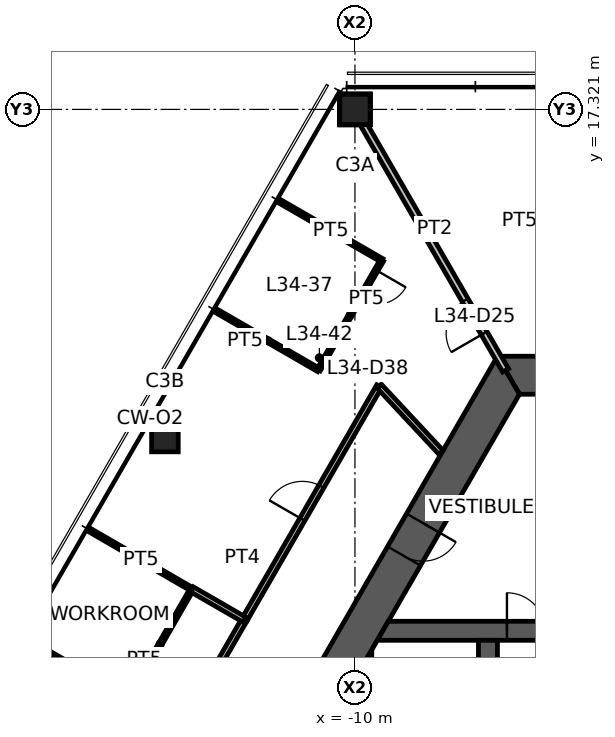
"""IFC4 building model, lengths in metres.
Left out: names, types, materials, properties, quantities, classifications, styles, units other than length and angle.
Written with IfcOpenShell. Run it as: python <this file> out.ifc"""

import sys

from ifc_helpers import new_model, si_unit, direction, frame, frame_2d, origin, origin_2d, place, context, subcontext, project, spatial, polyline, rectangle, hollow_rectangle, outline, extrude, element, fill, save


model = new_model("IFC4")
c1 = context("Model", 3, precision=1e-05, world=origin(), true_north=direction((0.0, 1.0)))
c2 = subcontext(c1, "Body", "Model", "MODEL_VIEW")
j1 = project(units=[si_unit("LENGTHUNIT", "METRE"), si_unit("PLANEANGLEUNIT", "RADIAN")], contexts=[c1])
p1 = place(None, origin())
s1 = spatial("IfcSite", under=j1, at=p1, CompositionType="ELEMENT")
p2 = place(p1, origin())
s2 = spatial("IfcBuilding", under=s1, at=p2, CompositionType="ELEMENT")
p3 = place(p2, frame((0.0, 0.0, 137.0)))
s3 = spatial("IfcBuildingStorey", under=s2, at=p3, CompositionType="ELEMENT", Elevation=137.0)
p4 = place(p3, frame((-10.0, 17.321, 0.0), z_axis=(0.0, 0.0, 1.0), x_axis=(1.0, 0.0, 0.0)))
e1 = element("IfcColumn", 1, at=p4, inside=s3, PredefinedType="COLUMN", context=c2, shape_type="SweptSolid", body=[
    extrude(hollow_rectangle(XDim=0.8, YDim=0.8, WallThickness=0.045, at=origin_2d()), origin(), (0.0, 0.0, 1.0), 3.9),
])
p5 = place(p3, frame((-15.0, 8.66, 0.0), z_axis=(0.0, 0.0, 1.0), x_axis=(1.0, 0.0, 0.0)))
e2 = element("IfcColumn", 2, at=p5, inside=s3, PredefinedType="COLUMN", context=c2, shape_type="SweptSolid", body=[
    extrude(hollow_rectangle(XDim=0.7, YDim=0.7, WallThickness=0.036, at=origin_2d()), origin(), (0.0, 0.0, 1.0), 3.9),
])
p6 = place(p3, frame((5.961, 10.325, 0.0), z_axis=(0.0, 0.0, 1.0), x_axis=(-1.0, 0.0, 0.0)))
e3 = element("IfcWall", 3, at=p6, inside=s3, PredefinedType="SHEAR", context=c2, shape_type="SweptSolid", body=[
    extrude(outline(polyline([(-0.289, -0.5), (4.661, -0.5), (5.561, -0.5), (6.361, -0.5), (7.261, -0.5), (12.211, -0.5), (11.634, 0.5), (7.261, 0.5), (6.361, 0.5), (5.561, 0.5), (4.661, 0.5), (0.289, 0.5), (-0.289, -0.5)])), origin(), (0.0, 0.0, 1.0), 3.9),
])
p7 = place(p6, frame((6.361, 0.0, 0.0)))
e4 = element("IfcOpeningElement", 4, at=p7, cuts=e3, PredefinedType="OPENING", context=c2, shape_type="SweptSolid", body=[
    extrude(rectangle(XDim=0.9, YDim=2.1, at=frame_2d((0.45, 1.05))), frame((0.0, 0.51, 0.0), z_axis=(0.0, -1.0, 0.0), x_axis=(1.0, 0.0, 0.0)), (0.0, 0.0, 1.0), 1.02),
])
p8 = place(p6, frame((4.661, 0.0, 0.0)))
e5 = element("IfcOpeningElement", 5, at=p8, cuts=e3, PredefinedType="OPENING", context=c2, shape_type="SweptSolid", body=[
    extrude(rectangle(XDim=0.9, YDim=2.1, at=frame_2d((0.45, 1.05))), frame((0.0, 0.51, 0.0), z_axis=(0.0, -1.0, 0.0), x_axis=(1.0, 0.0, 0.0)), (0.0, 0.0, 1.0), 1.02),
])
p9 = place(p3, frame((-5.961, 10.325, 0.0), z_axis=(0.0, 0.0, 1.0), x_axis=(-0.500004296715, -0.866022923061, 0.0)))
e6 = element("IfcWall", 6, at=p9, inside=s3, PredefinedType="SHEAR", context=c2, shape_type="SweptSolid", body=[
    extrude(outline(polyline([(-0.289, -0.5), (4.494, -0.5), (5.494, -0.5), (12.211, -0.5), (11.634, 0.5), (5.494, 0.5), (4.494, 0.5), (0.289, 0.5), (-0.289, -0.5)])), origin(), (0.0, 0.0, 1.0), 3.9),
])
p10 = place(p9, frame((4.494, 0.0, 0.0)))
e7 = element("IfcOpeningElement", 7, at=p10, cuts=e6, PredefinedType="OPENING", context=c2, shape_type="SweptSolid", body=[
    extrude(rectangle(XDim=1.0, YDim=2.1, at=frame_2d((0.5, 1.05))), frame((0.0, 0.51, 0.0), z_axis=(0.0, -1.0, 0.0), x_axis=(1.0, 0.0, 0.0)), (0.0, 0.0, 1.0), 1.02),
])
p11 = place(p3, frame((-9.266, 3.6, 0.0), z_axis=(0.0, 0.0, 1.0), x_axis=(1.0, 0.0, 0.0)))
e8 = element("IfcWall", 8, at=p11, inside=s3, PredefinedType="SHEAR", context=c2, shape_type="SweptSolid", body=[
    extrude(outline(polyline([(-0.144, -0.25), (3.266, -0.25), (4.266, -0.25), (5.667, -0.25), (6.767, -0.25), (7.916, -0.25), (7.916, 0.25), (6.767, 0.25), (5.667, 0.25), (4.266, 0.25), (3.266, 0.25), (0.144, 0.25), (-0.144, -0.25)])), origin(), (0.0, 0.0, 1.0), 3.9),
])
p12 = place(p11, frame((3.266, 0.0, 0.0)))
e9 = element("IfcOpeningElement", 9, at=p12, cuts=e8, PredefinedType="OPENING", context=c2, shape_type="SweptSolid", body=[
    extrude(rectangle(XDim=1.0, YDim=2.1, at=frame_2d((0.5, 1.05))), frame((0.0, 0.26, 0.0), z_axis=(0.0, -1.0, 0.0), x_axis=(1.0, 0.0, 0.0)), (0.0, 0.0, 1.0), 0.52),
])
p13 = place(p11, frame((5.667, 0.0, 0.0)))
e10 = element("IfcOpeningElement", 10, at=p13, cuts=e8, PredefinedType="OPENING", context=c2, shape_type="SweptSolid", body=[
    extrude(rectangle(XDim=1.1, YDim=2.1, at=frame_2d((0.55, 1.05))), frame((0.0, 0.26, 0.0), z_axis=(0.0, -1.0, 0.0), x_axis=(1.0, 0.0, 0.0)), (0.0, 0.0, 1.0), 0.52),
])
p14 = place(p3, frame((-6.5, -3.35, 0.0), z_axis=(0.0, 0.0, 1.0), x_axis=(0.0, 1.0, 0.0)))
e11 = element("IfcWall", 11, at=p14, inside=s3, PredefinedType="SHEAR", context=c2, shape_type="SweptSolid", body=[
    extrude(rectangle(XDim=6.7, YDim=0.5, at=frame_2d((3.35, 0.0))), origin(), (0.0, 0.0, 1.0), 3.9),
])
p15 = place(p14, frame((0.1, 0.0, 0.0)))
e12 = element("IfcOpeningElement", 12, at=p15, cuts=e11, PredefinedType="OPENING", context=c2, shape_type="SweptSolid", body=[
    extrude(rectangle(XDim=1.0, YDim=2.1, at=frame_2d((0.5, 1.05))), frame((0.0, 0.26, 0.0), z_axis=(0.0, -1.0, 0.0), x_axis=(1.0, 0.0, 0.0)), (0.0, 0.0, 1.0), 0.52),
])
p16 = place(p3, frame((-9.808, -2.662, 0.0), z_axis=(0.0, 0.0, 1.0), x_axis=(0.0, 1.0, 0.0)))
e13 = element("IfcWall", 13, at=p16, inside=s3, PredefinedType="SHEAR", context=c2, shape_type="SweptSolid", body=[
    extrude(outline(polyline([(-0.433, -0.25), (5.758, -0.25), (4.892, 0.25), (0.433, 0.25), (-0.433, -0.25)])), origin(), (0.0, 0.0, 1.0), 3.9),
])
p17 = place(p3, frame((-6.035, 10.453, 0.0), z_axis=(0.0, 0.0, 1.0), x_axis=(-0.499989830942, 0.866031274813, 0.0)))
e14 = element("IfcWall", 14, at=p17, inside=s3, PredefinedType="PARTITIONING", context=c2, shape_type="SweptSolid", body=[
    extrude(rectangle(XDim=7.93, YDim=0.175, at=frame_2d((3.965, 0.0))), origin(), (0.0, 0.0, 1.0), 3.05),
])
p18 = place(p17, frame((1.13, 0.0, 0.0)))
e15 = element("IfcOpeningElement", 15, at=p18, cuts=e14, PredefinedType="OPENING", context=c2, shape_type="SweptSolid", body=[
    extrude(rectangle(XDim=1.0, YDim=2.1, at=frame_2d((0.5, 1.05))), frame((0.0, 0.098, 0.0), z_axis=(0.0, -1.0, 0.0), x_axis=(1.0, 0.0, 0.0)), (0.0, 0.0, 1.0), 0.195),
])
p19 = place(p3, frame((-15.156, 0.0, 0.0), z_axis=(0.0, 0.0, 1.0), x_axis=(0.500014848696, 0.866016830716, 0.0)))
e16 = element("IfcWall", 16, at=p19, inside=s3, PredefinedType="PARTITIONING", context=c2, shape_type="SweptSolid", body=[
    extrude(rectangle(XDim=4.505, YDim=0.15, at=frame_2d((2.252, 0.0))), origin(), (0.0, 0.0, 1.0), 2.95),
])
p20 = place(p3, frame((-12.908, 3.893, 0.0), z_axis=(0.0, 0.0, 1.0), x_axis=(0.500006411147, 0.866021702275, 0.0)))
e17 = element("IfcWall", 17, at=p20, inside=s3, PredefinedType="PARTITIONING", context=c2, shape_type="SweptSolid", body=[
    extrude(rectangle(XDim=7.095, YDim=0.15, at=frame_2d((3.548, 0.0))), origin(), (0.0, 0.0, 1.0), 2.95),
])
p21 = place(p20, frame((3.047, 0.0, 0.0)))
e18 = element("IfcOpeningElement", 18, at=p21, cuts=e17, PredefinedType="OPENING", context=c2, shape_type="SweptSolid", body=[
    extrude(rectangle(XDim=1.0, YDim=2.1, at=frame_2d((0.5, 1.05))), frame((0.0, 0.085, 0.0), z_axis=(0.0, -1.0, 0.0), x_axis=(1.0, 0.0, 0.0)), (0.0, 0.0, 1.0), 0.17),
])
p22 = place(p3, frame((-9.36, 10.038, 0.0), z_axis=(0.0, 0.0, 1.0), x_axis=(0.681997114248, -0.731354863358, 0.0)))
e19 = element("IfcWall", 19, at=p22, inside=s3, PredefinedType="PARTITIONING", context=c2, shape_type="SweptSolid", body=[
    extrude(outline(polyline([(0.0, -0.075), (2.384, -0.075), (2.384, 0.0), (2.382, 0.075), (0.0, 0.075), (0.0, -0.075)])), origin(), (0.0, 0.0, 1.0), 2.95),
])
p23 = place(p3, frame((-11.98, 14.902, 0.0), z_axis=(0.0, 0.0, 1.0), x_axis=(0.866042875753, -0.499969736442, 0.0)))
e20 = element("IfcWall", 20, at=p23, inside=s3, PredefinedType="PARTITIONING", context=c2, shape_type="SweptSolid", body=[
    extrude(rectangle(XDim=3.105, YDim=0.1, at=frame_2d((1.553, 0.0))), origin(), (0.0, 0.0, 1.0), 2.95),
])
p24 = place(p3, frame((-10.956, 10.465, 0.0), z_axis=(0.0, 0.0, 1.0), x_axis=(-0.866044340336, 0.499967199496, 0.0)))
e21 = element("IfcWall", 21, at=p24, inside=s3, PredefinedType="PARTITIONING", context=c2, shape_type="SweptSolid", body=[
    extrude(rectangle(XDim=3.08, YDim=0.1, at=frame_2d((1.54, 0.0))), origin(), (0.0, 0.0, 1.0), 2.95),
])
p25 = place(p3, frame((-9.291, 13.349, 0.0), z_axis=(0.0, 0.0, 1.0), x_axis=(-0.500033344505, -0.86600615147, 0.0)))
e22 = element("IfcWall", 22, at=p25, inside=s3, PredefinedType="PARTITIONING", context=c2, shape_type="SweptSolid", body=[
    extrude(rectangle(XDim=3.331, YDim=0.1, at=frame_2d((1.666, 0.0))), origin(), (0.0, 0.0, 1.0), 2.95),
])
p26 = place(p25, frame((0.3, 0.0, 0.0)))
e23 = element("IfcOpeningElement", 23, at=p26, cuts=e22, PredefinedType="OPENING", context=c2, shape_type="SweptSolid", body=[
    extrude(rectangle(XDim=0.9, YDim=2.1, at=frame_2d((0.45, 1.05))), frame((0.0, 0.06, 0.0), z_axis=(0.0, -1.0, 0.0), x_axis=(1.0, 0.0, 0.0)), (0.0, 0.0, 1.0), 0.12),
])
p27 = place(p3, frame((-15.952, 1.811, 0.0), z_axis=(0.0, 0.0, 1.0), x_axis=(-0.866029832698, 0.499992328818, 0.0)))
e24 = element("IfcWall", 24, at=p27, inside=s3, PredefinedType="PARTITIONING", context=c2, shape_type="SweptSolid", body=[
    extrude(rectangle(XDim=3.08, YDim=0.1, at=frame_2d((1.54, 0.0))), origin(), (0.0, 0.0, 1.0), 2.95),
])
p28 = place(p3, frame((-14.291, 4.698, 0.0), z_axis=(0.0, 0.0, 1.0), x_axis=(-0.498780940327, -0.866728085138, 0.0)))
e25 = element("IfcWall", 25, at=p28, inside=s3, PredefinedType="PARTITIONING", context=c2, shape_type="SweptSolid", body=[
    extrude(rectangle(XDim=3.331, YDim=0.1, at=frame_2d((1.666, 0.0))), origin(), (0.0, 0.0, 1.0), 2.95),
])
p29 = place(p28, frame((2.131, 0.0, 0.0)))
e26 = element("IfcOpeningElement", 26, at=p29, cuts=e25, PredefinedType="OPENING", context=c2, shape_type="SweptSolid", body=[
    extrude(rectangle(XDim=0.9, YDim=2.1, at=frame_2d((0.45, 1.05))), frame((0.0, 0.06, 0.0), z_axis=(0.0, -1.0, 0.0), x_axis=(1.0, 0.0, 0.0)), (0.0, 0.0, 1.0), 0.12),
])
p30 = place(p3, frame((-16.976, 6.248, 0.0), z_axis=(0.0, 0.0, 1.0), x_axis=(0.865232439327, -0.501370946442, 0.0)))
e27 = element("IfcWall", 27, at=p30, inside=s3, PredefinedType="PARTITIONING", context=c2, shape_type="SweptSolid", body=[
    extrude(rectangle(XDim=3.105, YDim=0.1, at=frame_2d((1.553, 0.0))), origin(), (0.0, 0.0, 1.0), 2.95),
])
p31 = place(p3, frame((-14.289, 4.691, 0.0), z_axis=(0.0, 0.0, 1.0), x_axis=(0.865925490132, -0.500173015605, 0.0)))
e28 = element("IfcWall", 28, at=p31, inside=s3, PredefinedType="PARTITIONING", context=c2, shape_type="SweptSolid", body=[
    extrude(rectangle(XDim=1.595, YDim=0.15, at=frame_2d((0.797, 0.0))), origin(), (0.0, 0.0, 1.0), 2.95),
])
p32 = place(p10, origin())
e29 = element("IfcDoor", 29, at=p32, inside=s3, OperationType="SINGLE_SWING_LEFT", PredefinedType="DOOR", context=c2, shape_type="SweptSolid", body=[
    extrude(rectangle(XDim=1.0, YDim=2.1, at=frame_2d((0.5, 1.05))), frame((0.0, 0.025, 0.0), z_axis=(0.0, -1.0, 0.0), x_axis=(1.0, 0.0, 0.0)), (0.0, 0.0, 1.0), 0.05),
])
fill(e7, e29)
p33 = place(p12, origin())
e30 = element("IfcDoor", 30, at=p33, inside=s3, OperationType="SINGLE_SWING_LEFT", PredefinedType="DOOR", context=c2, shape_type="SweptSolid", body=[
    extrude(rectangle(XDim=1.0, YDim=2.1, at=frame_2d((0.5, 1.05))), frame((0.0, 0.025, 0.0), z_axis=(0.0, -1.0, 0.0), x_axis=(1.0, 0.0, 0.0)), (0.0, 0.0, 1.0), 0.05),
])
fill(e9, e30)
p34 = place(p18, origin())
e31 = element("IfcDoor", 31, at=p34, inside=s3, OperationType="SINGLE_SWING_LEFT", PredefinedType="DOOR", context=c2, shape_type="SweptSolid", body=[
    extrude(rectangle(XDim=1.0, YDim=2.1, at=frame_2d((0.5, 1.05))), frame((0.0, 0.025, 0.0), z_axis=(0.0, -1.0, 0.0), x_axis=(1.0, 0.0, 0.0)), (0.0, 0.0, 1.0), 0.05),
])
fill(e15, e31)
p35 = place(p21, origin())
e32 = element("IfcDoor", 32, at=p35, inside=s3, OperationType="SINGLE_SWING_LEFT", PredefinedType="DOOR", context=c2, shape_type="SweptSolid", body=[
    extrude(rectangle(XDim=1.0, YDim=2.1, at=frame_2d((0.5, 1.05))), frame((0.0, 0.025, 0.0), z_axis=(0.0, -1.0, 0.0), x_axis=(1.0, 0.0, 0.0)), (0.0, 0.0, 1.0), 0.05),
])
fill(e18, e32)
p36 = place(p26, origin())
e33 = element("IfcDoor", 33, at=p36, inside=s3, OperationType="SINGLE_SWING_LEFT", PredefinedType="DOOR", context=c2, shape_type="SweptSolid", body=[
    extrude(rectangle(XDim=0.9, YDim=2.1, at=frame_2d((0.45, 1.05))), frame((0.0, 0.025, 0.0), z_axis=(0.0, -1.0, 0.0), x_axis=(1.0, 0.0, 0.0)), (0.0, 0.0, 1.0), 0.05),
])
fill(e23, e33)
save(model, sys.argv[1])
